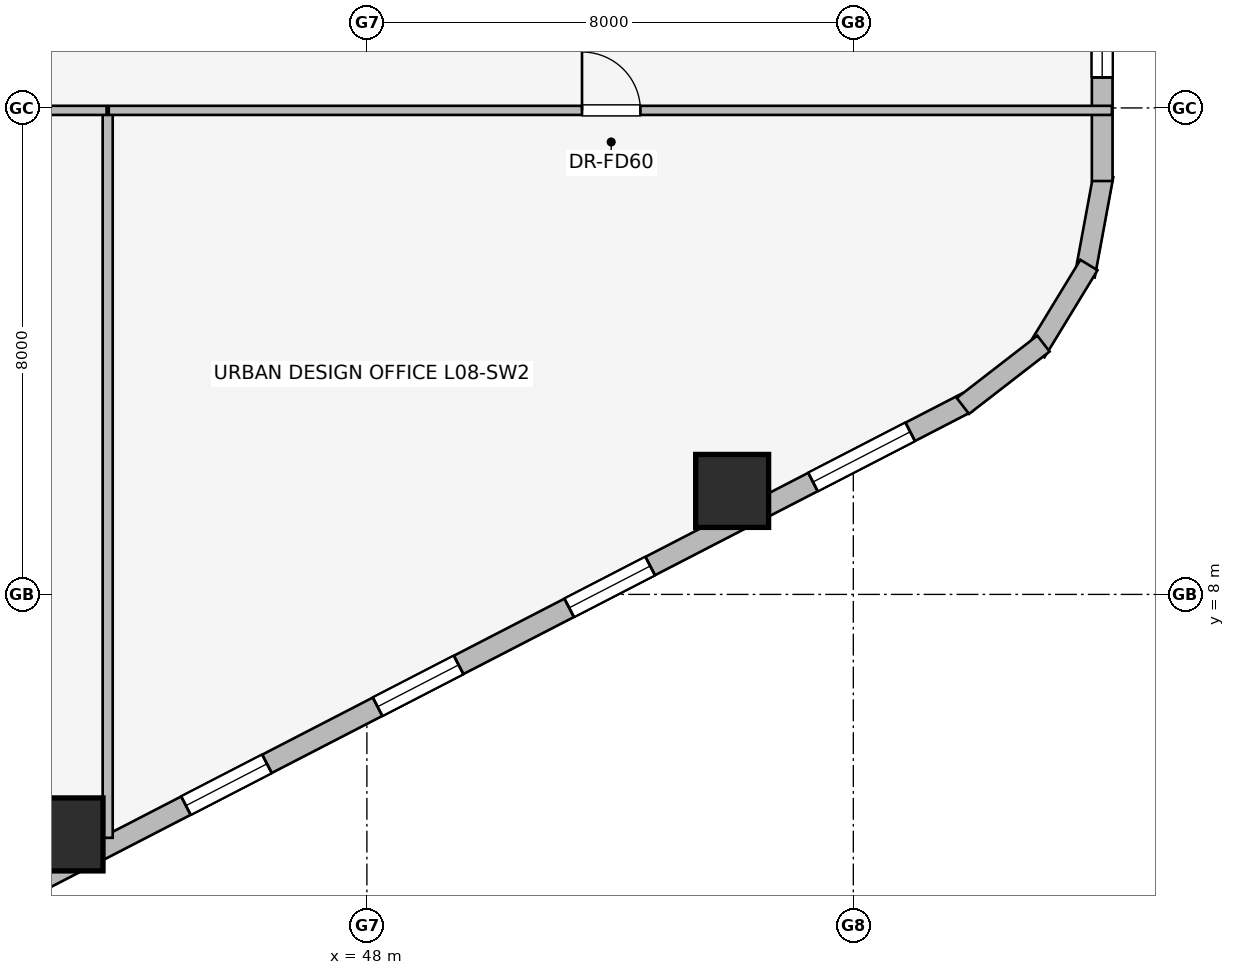
"""IFC4 building model, lengths in metres.
Left out: names, types, materials, properties, quantities, classifications, styles, units other than length and angle.
Written with IfcOpenShell. Run it as: python <this file> out.ifc"""

import sys

from ifc_helpers import new_model, si_unit, direction, frame, frame_2d, origin, origin_2d, place, context, subcontext, project, spatial, rectangle, extrude, element, fill, save


model = new_model("IFC4")
c1 = context("Model", 3, precision=1e-05, world=origin(), true_north=direction((0.0, 1.0)))
c2 = subcontext(c1, "Body", "Model", "MODEL_VIEW")
j1 = project(units=[si_unit("LENGTHUNIT", "METRE"), si_unit("PLANEANGLEUNIT", "RADIAN")], contexts=[c1])
p1 = place(None, origin())
s1 = spatial("IfcSite", under=j1, at=p1, CompositionType="ELEMENT")
p2 = place(p1, origin())
s2 = spatial("IfcBuilding", under=s1, at=p2, CompositionType="ELEMENT")
p3 = place(p2, frame((0.0, 0.0, 34.3)))
s3 = spatial("IfcBuildingStorey", under=s2, at=p3, CompositionType="ELEMENT", Elevation=34.3)
for number, where, z_axis, x_axis in (
    (1, (43.06, 4.053, 0.0), (0.0, 0.0, 1.0), (1.0, 0.0, 0.0)),
    (2, (54.007, 9.702, 0.0), (0.0, 0.0, 1.0), (1.0, 0.0, 0.0)),
):
    element("IfcColumn", number, at=place(p3, frame(where, z_axis=z_axis, x_axis=x_axis)), inside=s3, PredefinedType="COLUMN", context=c2, shape_type="SweptSolid", body=[
        extrude(rectangle(XDim=1.2, YDim=1.2, at=origin_2d()), origin(), (0.0, 0.0, 1.0), 3.65),
    ])
p4 = place(p3, frame((57.876, 11.159, 0.0), z_axis=(0.0, 0.0, 1.0), x_axis=(-0.888634413993, -0.458616264721, 0.0)))
e3 = element("IfcWall", 3, at=p4, inside=s3, PredefinedType="STANDARD", context=c2, shape_type="SweptSolid", body=[
    extrude(rectangle(XDim=20.531, YDim=0.34, at=frame_2d((10.266, 0.0))), origin(), (0.0, 0.0, 1.0), 2.684),
])
p5 = place(p4, frame((1.058, 0.0, 0.75)))
e4 = element("IfcOpeningElement", 4, at=p5, cuts=e3, PredefinedType="OPENING", context=c2, shape_type="SweptSolid", body=[
    extrude(rectangle(XDim=1.8, YDim=1.5, at=frame_2d((0.9, 0.75))), frame((0.0, 0.18, 0.0), z_axis=(0.0, -1.0, 0.0), x_axis=(1.0, 0.0, 0.0)), (0.0, 0.0, 1.0), 0.36),
])
p6 = place(p4, frame((5.87, 0.0, 0.75)))
e5 = element("IfcOpeningElement", 5, at=p6, cuts=e3, PredefinedType="OPENING", context=c2, shape_type="SweptSolid", body=[
    extrude(rectangle(XDim=1.5, YDim=1.5, at=frame_2d((0.75, 0.75))), frame((0.0, 0.18, 0.0), z_axis=(0.0, -1.0, 0.0), x_axis=(1.0, 0.0, 0.0)), (0.0, 0.0, 1.0), 0.36),
])
p7 = place(p4, frame((9.416, 0.0, 0.75)))
e6 = element("IfcOpeningElement", 6, at=p7, cuts=e3, PredefinedType="OPENING", context=c2, shape_type="SweptSolid", body=[
    extrude(rectangle(XDim=1.5, YDim=1.5, at=frame_2d((0.75, 0.75))), frame((0.0, 0.18, 0.0), z_axis=(0.0, -1.0, 0.0), x_axis=(1.0, 0.0, 0.0)), (0.0, 0.0, 1.0), 0.36),
])
p8 = place(p4, frame((12.963, 0.0, 0.75)))
e7 = element("IfcOpeningElement", 7, at=p8, cuts=e3, PredefinedType="OPENING", context=c2, shape_type="SweptSolid", body=[
    extrude(rectangle(XDim=1.5, YDim=1.5, at=frame_2d((0.75, 0.75))), frame((0.0, 0.18, 0.0), z_axis=(0.0, -1.0, 0.0), x_axis=(1.0, 0.0, 0.0)), (0.0, 0.0, 1.0), 0.36),
])
p9 = place(p4, frame((17.673, 0.0, 0.75)))
e8 = element("IfcOpeningElement", 8, at=p9, cuts=e3, PredefinedType="OPENING", context=c2, shape_type="SweptSolid", body=[
    extrude(rectangle(XDim=1.8, YDim=1.5, at=frame_2d((0.9, 0.75))), frame((0.0, 0.18, 0.0), z_axis=(0.0, -1.0, 0.0), x_axis=(1.0, 0.0, 0.0)), (0.0, 0.0, 1.0), 0.36),
])
p10 = place(p3, frame((60.113, 14.892, 0.0), z_axis=(0.0, 0.0, 1.0), x_axis=(-0.181714143354, -0.983351397063, 0.0)))
e9 = element("IfcWall", 9, at=p10, inside=s3, PredefinedType="STANDARD", context=c2, shape_type="SweptSolid", body=[
    extrude(rectangle(XDim=1.678, YDim=0.33, at=frame_2d((0.839, 0.0))), origin(), (0.0, 0.0, 1.0), 3.39),
])
p11 = place(p3, frame((59.875, 13.417, 0.0), z_axis=(0.0, 0.0, 1.0), x_axis=(-0.520584129191, -0.853810379671, 0.0)))
e10 = element("IfcWall", 10, at=p11, inside=s3, PredefinedType="STANDARD", context=c2, shape_type="SweptSolid", body=[
    extrude(rectangle(XDim=1.677, YDim=0.33, at=frame_2d((0.838, 0.0))), origin(), (0.0, 0.0, 1.0), 3.39),
])
p12 = place(p3, frame((59.127, 12.125, 0.0), z_axis=(0.0, 0.0, 1.0), x_axis=(-0.790691856293, -0.61221433207, 0.0)))
e11 = element("IfcWall", 11, at=p12, inside=s3, PredefinedType="STANDARD", context=c2, shape_type="SweptSolid", body=[
    extrude(rectangle(XDim=1.676, YDim=0.33, at=frame_2d((0.838, 0.0))), origin(), (0.0, 0.0, 1.0), 3.39),
])
p13 = place(p3, frame((60.093, 33.202, 0.0), z_axis=(0.0, 0.0, 1.0), x_axis=(0.0, -1.0, 0.0)))
e12 = element("IfcWall", 12, at=p13, inside=s3, PredefinedType="STANDARD", context=c2, shape_type="SweptSolid", body=[
    extrude(rectangle(XDim=18.404, YDim=0.34, at=frame_2d((9.202, 0.0))), origin(), (0.0, 0.0, 1.0), 2.684),
])
p14 = place(p13, frame((1.744, 0.0, 0.75)))
e13 = element("IfcOpeningElement", 13, at=p14, cuts=e12, PredefinedType="OPENING", context=c2, shape_type="SweptSolid", body=[
    extrude(rectangle(XDim=1.05, YDim=1.4, at=frame_2d((0.525, 0.7))), frame((0.0, 0.18, 0.0), z_axis=(0.0, -1.0, 0.0), x_axis=(1.0, 0.0, 0.0)), (0.0, 0.0, 1.0), 0.36),
])
p15 = place(p13, frame((5.125, 0.0, 0.75)))
e14 = element("IfcOpeningElement", 14, at=p15, cuts=e12, PredefinedType="OPENING", context=c2, shape_type="SweptSolid", body=[
    extrude(rectangle(XDim=1.5, YDim=1.5, at=frame_2d((0.75, 0.75))), frame((0.0, 0.18, 0.0), z_axis=(0.0, -1.0, 0.0), x_axis=(1.0, 0.0, 0.0)), (0.0, 0.0, 1.0), 0.36),
])
p16 = place(p13, frame((8.033, 0.0, 0.75)))
e15 = element("IfcOpeningElement", 15, at=p16, cuts=e12, PredefinedType="OPENING", context=c2, shape_type="SweptSolid", body=[
    extrude(rectangle(XDim=1.5, YDim=1.5, at=frame_2d((0.75, 0.75))), frame((0.0, 0.18, 0.0), z_axis=(0.0, -1.0, 0.0), x_axis=(1.0, 0.0, 0.0)), (0.0, 0.0, 1.0), 0.36),
])
p17 = place(p13, frame((11.572, 0.0, 0.75)))
e16 = element("IfcOpeningElement", 16, at=p17, cuts=e12, PredefinedType="OPENING", context=c2, shape_type="SweptSolid", body=[
    extrude(rectangle(XDim=1.8, YDim=1.5, at=frame_2d((0.9, 0.75))), frame((0.0, 0.18, 0.0), z_axis=(0.0, -1.0, 0.0), x_axis=(1.0, 0.0, 0.0)), (0.0, 0.0, 1.0), 0.36),
])
p18 = place(p13, frame((15.65, 0.0, 0.75)))
e17 = element("IfcOpeningElement", 17, at=p18, cuts=e12, PredefinedType="OPENING", context=c2, shape_type="SweptSolid", body=[
    extrude(rectangle(XDim=1.05, YDim=1.4, at=frame_2d((0.525, 0.7))), frame((0.0, 0.18, 0.0), z_axis=(0.0, -1.0, 0.0), x_axis=(1.0, 0.0, 0.0)), (0.0, 0.0, 1.0), 0.36),
])
p19 = place(p3, frame((43.737, 3.997, 0.0), z_axis=(0.0, 0.0, 1.0), x_axis=(0.0, 1.0, 0.0)))
e18 = element("IfcWall", 18, at=p19, inside=s3, PredefinedType="PARTITIONING", context=c2, shape_type="SweptSolid", body=[
    extrude(rectangle(XDim=11.933, YDim=0.165, at=frame_2d((5.966, 0.0))), origin(), (0.0, 0.0, 1.0), 3.39),
])
p20 = place(p3, frame((32.85, 15.96, 0.0), z_axis=(0.0, 0.0, 1.0), x_axis=(1.0, 0.0, 0.0)))
e19 = element("IfcWall", 19, at=p20, inside=s3, PredefinedType="PARTITIONING", context=c2, shape_type="SweptSolid", body=[
    extrude(rectangle(XDim=10.869, YDim=0.15, at=frame_2d((5.435, 0.0))), origin(), (0.0, 0.0, 1.0), 3.39),
])
p21 = place(p20, frame((4.955, 0.0, 0.0)))
e20 = element("IfcOpeningElement", 20, at=p21, cuts=e19, PredefinedType="OPENING", context=c2, shape_type="SweptSolid", body=[
    extrude(rectangle(XDim=0.96, YDim=2.0, at=frame_2d((0.48, 1.0))), frame((0.0, 0.085, 0.0), z_axis=(0.0, -1.0, 0.0), x_axis=(1.0, 0.0, 0.0)), (0.0, 0.0, 1.0), 0.17),
])
p22 = place(p3, frame((43.755, 15.96, 0.0), z_axis=(0.0, 0.0, 1.0), x_axis=(1.0, 0.0, 0.0)))
e21 = element("IfcWall", 21, at=p22, inside=s3, PredefinedType="PARTITIONING", context=c2, shape_type="SweptSolid", body=[
    extrude(rectangle(XDim=16.498, YDim=0.15, at=frame_2d((8.249, 0.0))), origin(), (0.0, 0.0, 1.0), 3.39),
])
p23 = place(p22, frame((7.783, 0.0, 0.0)))
e22 = element("IfcOpeningElement", 22, at=p23, cuts=e21, PredefinedType="OPENING", context=c2, shape_type="SweptSolid", body=[
    extrude(rectangle(XDim=0.96, YDim=2.0, at=frame_2d((0.48, 1.0))), frame((0.0, 0.085, 0.0), z_axis=(0.0, -1.0, 0.0), x_axis=(1.0, 0.0, 0.0)), (0.0, 0.0, 1.0), 0.17),
])
p24 = place(p5, origin())
e23 = element("IfcWindow", 23, at=p24, inside=s3, PartitioningType="SINGLE_PANEL", PredefinedType="WINDOW", context=c2, shape_type="SweptSolid", body=[
    extrude(rectangle(XDim=1.8, YDim=1.5, at=frame_2d((0.9, 0.75))), frame((0.0, 0.03, 0.0), z_axis=(0.0, -1.0, 0.0), x_axis=(1.0, 0.0, 0.0)), (0.0, 0.0, 1.0), 0.06),
])
fill(e4, e23)
p25 = place(p6, origin())
e24 = element("IfcWindow", 24, at=p25, inside=s3, PartitioningType="SINGLE_PANEL", PredefinedType="WINDOW", context=c2, shape_type="SweptSolid", body=[
    extrude(rectangle(XDim=1.5, YDim=1.5, at=frame_2d((0.75, 0.75))), frame((0.0, 0.03, 0.0), z_axis=(0.0, -1.0, 0.0), x_axis=(1.0, 0.0, 0.0)), (0.0, 0.0, 1.0), 0.06),
])
fill(e5, e24)
p26 = place(p7, origin())
e25 = element("IfcWindow", 25, at=p26, inside=s3, PartitioningType="SINGLE_PANEL", PredefinedType="WINDOW", context=c2, shape_type="SweptSolid", body=[
    extrude(rectangle(XDim=1.5, YDim=1.5, at=frame_2d((0.75, 0.75))), frame((0.0, 0.03, 0.0), z_axis=(0.0, -1.0, 0.0), x_axis=(1.0, 0.0, 0.0)), (0.0, 0.0, 1.0), 0.06),
])
fill(e6, e25)
p27 = place(p8, origin())
e26 = element("IfcWindow", 26, at=p27, inside=s3, PartitioningType="SINGLE_PANEL", PredefinedType="WINDOW", context=c2, shape_type="SweptSolid", body=[
    extrude(rectangle(XDim=1.5, YDim=1.5, at=frame_2d((0.75, 0.75))), frame((0.0, 0.03, 0.0), z_axis=(0.0, -1.0, 0.0), x_axis=(1.0, 0.0, 0.0)), (0.0, 0.0, 1.0), 0.06),
])
fill(e7, e26)
p28 = place(p18, origin())
e27 = element("IfcWindow", 27, at=p28, inside=s3, PartitioningType="SINGLE_PANEL", PredefinedType="WINDOW", context=c2, shape_type="SweptSolid", body=[
    extrude(rectangle(XDim=1.05, YDim=1.4, at=frame_2d((0.525, 0.7))), frame((0.0, 0.03, 0.0), z_axis=(0.0, -1.0, 0.0), x_axis=(1.0, 0.0, 0.0)), (0.0, 0.0, 1.0), 0.06),
])
fill(e17, e27)
p29 = place(p23, origin())
e28 = element("IfcDoor", 28, at=p29, inside=s3, OperationType="SINGLE_SWING_LEFT", PredefinedType="DOOR", context=c2, shape_type="SweptSolid", body=[
    extrude(rectangle(XDim=0.96, YDim=2.0, at=frame_2d((0.48, 1.0))), frame((0.0, 0.025, 0.0), z_axis=(0.0, -1.0, 0.0), x_axis=(1.0, 0.0, 0.0)), (0.0, 0.0, 1.0), 0.05),
])
fill(e22, e28)
save(model, sys.argv[1])
